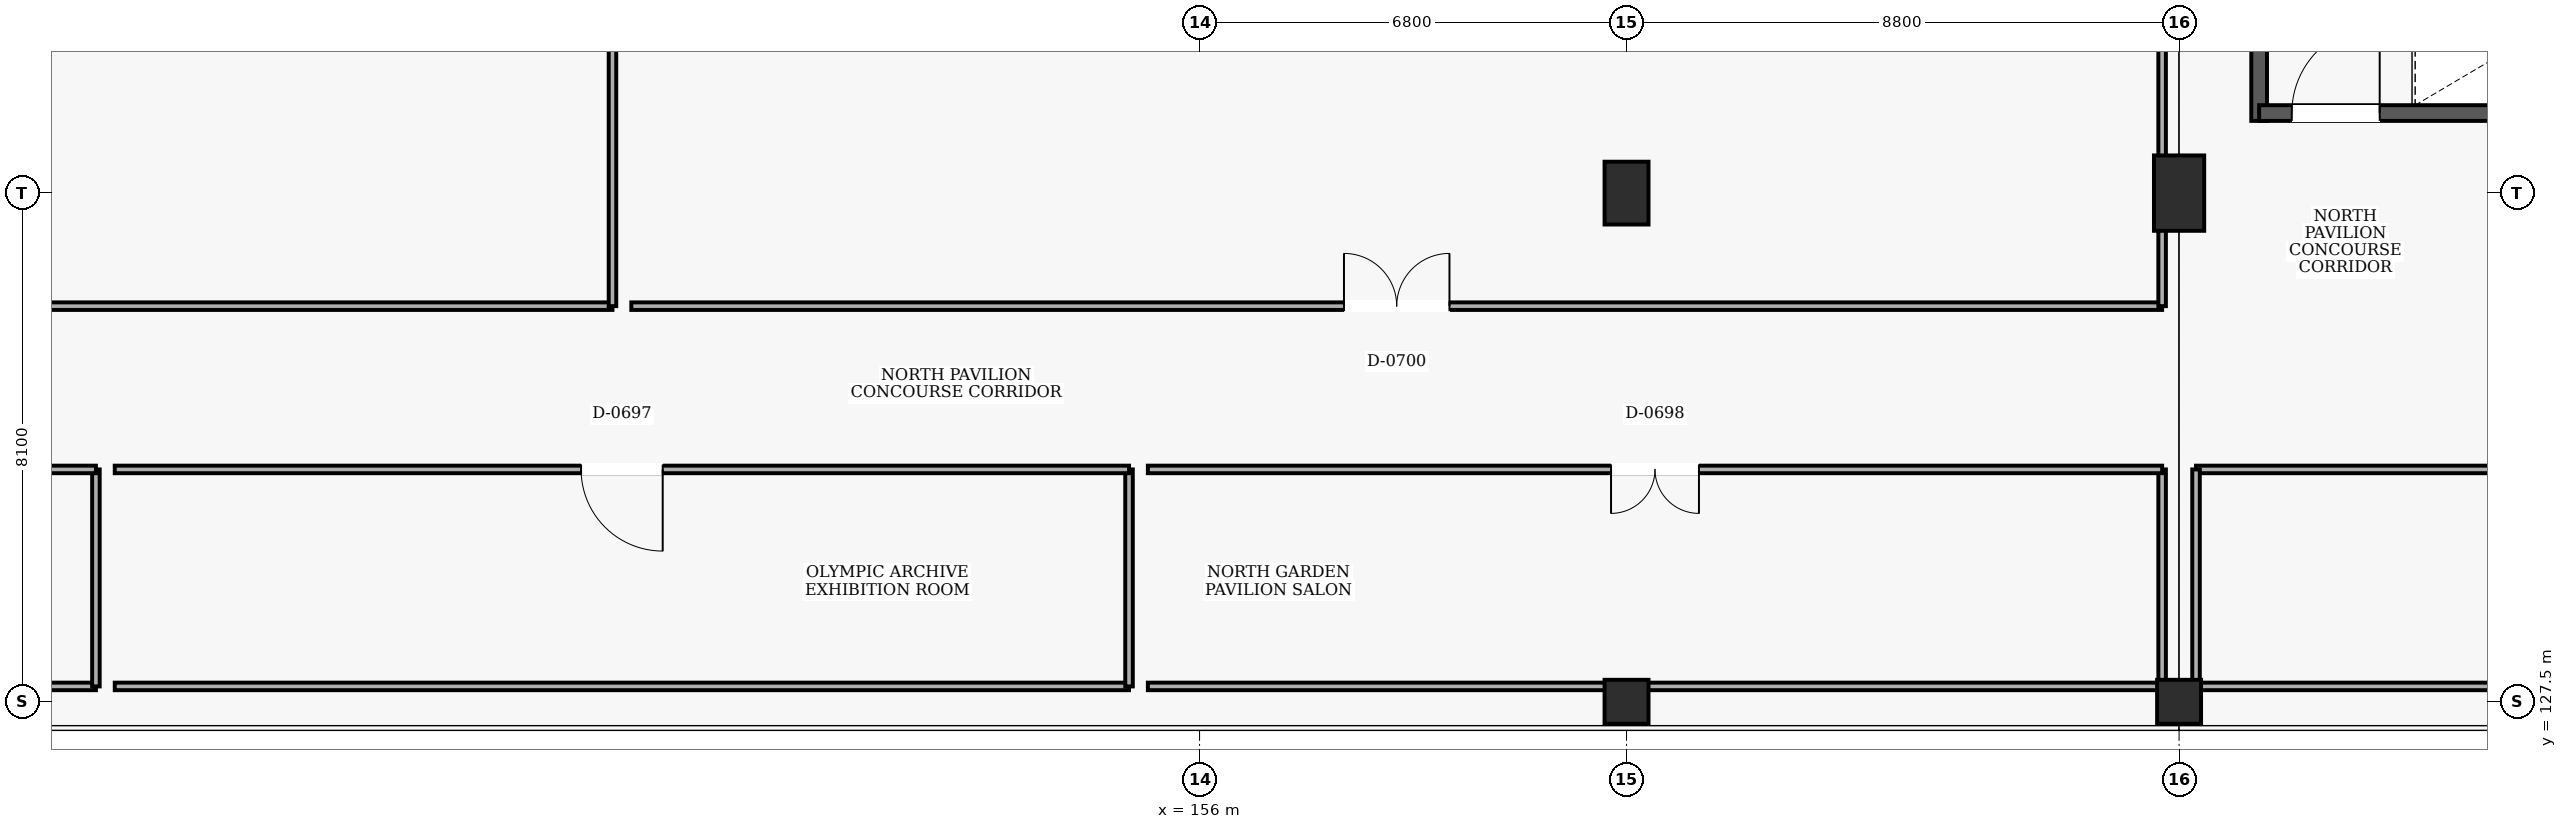
"""IFC4 building model, lengths in metres.
Left out: names, types, materials, properties, quantities, classifications, styles, units other than length and angle.
Written with IfcOpenShell. Run it as: python <this file> out.ifc"""

import sys

from ifc_helpers import new_model, si_unit, direction, frame, frame_2d, origin, origin_2d, place, context, subcontext, project, spatial, rectangle, extrude, element, fill, save


model = new_model("IFC4")
c1 = context("Model", 3, precision=1e-05, world=origin(), true_north=direction((0.0, 1.0)))
c2 = subcontext(c1, "Body", "Model", "MODEL_VIEW")
j1 = project(units=[si_unit("LENGTHUNIT", "METRE"), si_unit("PLANEANGLEUNIT", "RADIAN")], contexts=[c1])
p1 = place(None, origin())
s1 = spatial("IfcSite", under=j1, at=p1, CompositionType="ELEMENT")
p2 = place(p1, origin())
s2 = spatial("IfcBuilding", under=s1, at=p2, CompositionType="ELEMENT")
p3 = place(p2, frame((0.0, 0.0, 15.0)))
s3 = spatial("IfcBuildingStorey", under=s2, at=p3, CompositionType="ELEMENT", Elevation=15.0)
p4 = place(p3, frame((162.8, 127.5, 0.0), z_axis=(0.0, 0.0, 1.0), x_axis=(1.0, 0.0, 0.0)))
e1 = element("IfcColumn", 1, at=p4, inside=s3, PredefinedType="COLUMN", context=c2, shape_type="SweptSolid", body=[
    extrude(rectangle(XDim=0.7, YDim=0.7, at=origin_2d()), origin(), (0.0, 0.0, 1.0), 4.8),
])
p5 = place(p3, frame((162.8, 135.6, 0.0), z_axis=(0.0, 0.0, 1.0), x_axis=(1.0, 0.0, 0.0)))
e2 = element("IfcColumn", 2, at=p5, inside=s3, PredefinedType="COLUMN", context=c2, shape_type="SweptSolid", body=[
    extrude(rectangle(XDim=0.7, YDim=1.0, at=origin_2d()), origin(), (0.0, 0.0, 1.0), 4.8),
])
p6 = place(p3, frame((171.6, 127.5, 0.0), z_axis=(0.0, 0.0, 1.0), x_axis=(1.0, 0.0, 0.0)))
e3 = element("IfcColumn", 3, at=p6, inside=s3, PredefinedType="COLUMN", context=c2, shape_type="SweptSolid", body=[
    extrude(rectangle(XDim=0.7, YDim=0.7, at=origin_2d()), origin(), (0.0, 0.0, 1.0), 4.8),
])
p7 = place(p3, frame((171.6, 135.6, 0.0), z_axis=(0.0, 0.0, 1.0), x_axis=(1.0, 0.0, 0.0)))
e4 = element("IfcColumn", 4, at=p7, inside=s3, PredefinedType="COLUMN", context=c2, shape_type="SweptSolid", body=[
    extrude(rectangle(XDim=0.8, YDim=1.2, at=origin_2d()), origin(), (0.0, 0.0, 1.0), 4.8),
])
p8 = place(p3, frame((172.875, 142.12, 0.0), z_axis=(0.0, 0.0, 1.0), x_axis=(0.0, -1.0, 0.0)))
e5 = element("IfcWall", 5, at=p8, inside=s3, PredefinedType="SHEAR", context=c2, shape_type="SweptSolid", body=[
    extrude(rectangle(XDim=5.37, YDim=0.25, at=frame_2d((2.685, 0.0))), origin(), (0.0, 0.0, 1.0), 4.5),
])
p9 = place(p3, frame((172.875, 136.875, 0.0), z_axis=(0.0, 0.0, 1.0), x_axis=(1.0, 0.0, 0.0)))
e6 = element("IfcWall", 6, at=p9, inside=s3, PredefinedType="SHEAR", context=c2, shape_type="SweptSolid", body=[
    extrude(rectangle(XDim=10.85, YDim=0.25, at=frame_2d((5.425, 0.0))), origin(), (0.0, 0.0, 1.0), 4.5),
])
p10 = place(p9, frame((0.52, 0.0, 0.0)))
e7 = element("IfcOpeningElement", 7, at=p10, cuts=e6, PredefinedType="OPENING", context=c2, shape_type="SweptSolid", body=[
    extrude(rectangle(XDim=1.4, YDim=2.15, at=frame_2d((0.7, 1.075))), frame((0.0, 0.135, 0.0), z_axis=(0.0, -1.0, 0.0), x_axis=(1.0, 0.0, 0.0)), (0.0, 0.0, 1.0), 0.27),
])
p11 = place(p3, frame((122.27, 127.745, 0.0), z_axis=(0.0, 0.0, 1.0), x_axis=(1.0, 0.0, 0.0)))
e8 = element("IfcWall", 8, at=p11, inside=s3, PredefinedType="PARTITIONING", context=c2, shape_type="SweptSolid", body=[
    extrude(rectangle(XDim=16.153, YDim=0.12, at=frame_2d((8.077, 0.0))), origin(), (0.0, 0.0, 1.0), 4.5),
])
p12 = place(p3, frame((138.423, 127.745, 0.0), z_axis=(0.0, 0.0, 1.0), x_axis=(0.0, 1.0, 0.0)))
e9 = element("IfcWall", 9, at=p12, inside=s3, PredefinedType="PARTITIONING", context=c2, shape_type="SweptSolid", body=[
    extrude(rectangle(XDim=3.455, YDim=0.12, at=frame_2d((1.728, 0.0))), origin(), (0.0, 0.0, 1.0), 4.5),
])
p13 = place(p3, frame((138.423, 131.2, 0.0), z_axis=(0.0, 0.0, 1.0), x_axis=(-1.0, 0.0, 0.0)))
e10 = element("IfcWall", 10, at=p13, inside=s3, PredefinedType="PARTITIONING", context=c2, shape_type="SweptSolid", body=[
    extrude(rectangle(XDim=16.153, YDim=0.12, at=frame_2d((8.077, 0.0))), origin(), (0.0, 0.0, 1.0), 4.5),
])
p14 = place(p13, frame((7.477, 0.0, 0.0)))
e11 = element("IfcOpeningElement", 11, at=p14, cuts=e10, PredefinedType="OPENING", context=c2, shape_type="SweptSolid", body=[
    extrude(rectangle(XDim=1.2, YDim=2.15, at=frame_2d((0.6, 1.075))), frame((0.0, 0.07, 0.0), z_axis=(0.0, -1.0, 0.0), x_axis=(1.0, 0.0, 0.0)), (0.0, 0.0, 1.0), 0.14),
])
p15 = place(p3, frame((138.723, 127.745, 0.0), z_axis=(0.0, 0.0, 1.0), x_axis=(1.0, 0.0, 0.0)))
e12 = element("IfcWall", 12, at=p15, inside=s3, PredefinedType="PARTITIONING", context=c2, shape_type="SweptSolid", body=[
    extrude(rectangle(XDim=16.153, YDim=0.12, at=frame_2d((8.077, 0.0))), origin(), (0.0, 0.0, 1.0), 4.5),
])
p16 = place(p3, frame((154.877, 127.745, 0.0), z_axis=(0.0, 0.0, 1.0), x_axis=(0.0, 1.0, 0.0)))
e13 = element("IfcWall", 13, at=p16, inside=s3, PredefinedType="PARTITIONING", context=c2, shape_type="SweptSolid", body=[
    extrude(rectangle(XDim=3.455, YDim=0.12, at=frame_2d((1.728, 0.0))), origin(), (0.0, 0.0, 1.0), 4.5),
])
p17 = place(p3, frame((154.877, 131.2, 0.0), z_axis=(0.0, 0.0, 1.0), x_axis=(-1.0, 0.0, 0.0)))
e14 = element("IfcWall", 14, at=p17, inside=s3, PredefinedType="PARTITIONING", context=c2, shape_type="SweptSolid", body=[
    extrude(rectangle(XDim=16.153, YDim=0.12, at=frame_2d((8.077, 0.0))), origin(), (0.0, 0.0, 1.0), 4.5),
])
p18 = place(p17, frame((7.427, 0.0, 0.0)))
e15 = element("IfcOpeningElement", 15, at=p18, cuts=e14, PredefinedType="OPENING", context=c2, shape_type="SweptSolid", body=[
    extrude(rectangle(XDim=1.3, YDim=2.2, at=frame_2d((0.65, 1.1))), frame((0.0, 0.07, 0.0), z_axis=(0.0, -1.0, 0.0), x_axis=(1.0, 0.0, 0.0)), (0.0, 0.0, 1.0), 0.14),
])
p19 = place(p3, frame((155.177, 127.745, 0.0), z_axis=(0.0, 0.0, 1.0), x_axis=(1.0, 0.0, 0.0)))
e16 = element("IfcWall", 16, at=p19, inside=s3, PredefinedType="PARTITIONING", context=c2, shape_type="SweptSolid", body=[
    extrude(rectangle(XDim=16.153, YDim=0.12, at=frame_2d((8.077, 0.0))), origin(), (0.0, 0.0, 1.0), 3.78),
])
p20 = place(p3, frame((171.33, 127.745, 0.0), z_axis=(0.0, 0.0, 1.0), x_axis=(0.0, 1.0, 0.0)))
e17 = element("IfcWall", 17, at=p20, inside=s3, PredefinedType="PARTITIONING", context=c2, shape_type="SweptSolid", body=[
    extrude(rectangle(XDim=3.455, YDim=0.12, at=frame_2d((1.728, 0.0))), origin(), (0.0, 0.0, 1.0), 3.78),
])
p21 = place(p3, frame((171.33, 131.2, 0.0), z_axis=(0.0, 0.0, 1.0), x_axis=(-1.0, 0.0, 0.0)))
e18 = element("IfcWall", 18, at=p21, inside=s3, PredefinedType="PARTITIONING", context=c2, shape_type="SweptSolid", body=[
    extrude(rectangle(XDim=16.153, YDim=0.12, at=frame_2d((8.077, 0.0))), origin(), (0.0, 0.0, 1.0), 4.5),
])
p22 = place(p21, frame((7.377, 0.0, 0.0)))
e19 = element("IfcOpeningElement", 19, at=p22, cuts=e18, PredefinedType="OPENING", context=c2, shape_type="SweptSolid", body=[
    extrude(rectangle(XDim=1.4, YDim=2.2, at=frame_2d((0.7, 1.1))), frame((0.0, 0.07, 0.0), z_axis=(0.0, -1.0, 0.0), x_axis=(1.0, 0.0, 0.0)), (0.0, 0.0, 1.0), 0.14),
])
p23 = place(p3, frame((122.27, 133.8, 0.0), z_axis=(0.0, 0.0, 1.0), x_axis=(1.0, 0.0, 0.0)))
e20 = element("IfcWall", 20, at=p23, inside=s3, PredefinedType="PARTITIONING", context=c2, shape_type="SweptSolid", body=[
    extrude(rectangle(XDim=24.38, YDim=0.12, at=frame_2d((12.19, 0.0))), origin(), (0.0, 0.0, 1.0), 4.5),
])
p24 = place(p23, frame((11.415, 0.0, 0.0)))
e21 = element("IfcOpeningElement", 21, at=p24, cuts=e20, PredefinedType="OPENING", context=c2, shape_type="SweptSolid", body=[
    extrude(rectangle(XDim=1.55, YDim=2.2, at=frame_2d((0.775, 1.1))), frame((0.0, 0.07, 0.0), z_axis=(0.0, -1.0, 0.0), x_axis=(1.0, 0.0, 0.0)), (0.0, 0.0, 1.0), 0.14),
])
p25 = place(p3, frame((146.65, 133.8, 0.0), z_axis=(0.0, 0.0, 1.0), x_axis=(0.0, 1.0, 0.0)))
e22 = element("IfcWall", 22, at=p25, inside=s3, PredefinedType="PARTITIONING", context=c2, shape_type="SweptSolid", body=[
    extrude(rectangle(XDim=17.5, YDim=0.12, at=frame_2d((8.75, 0.0))), origin(), (0.0, 0.0, 1.0), 4.5),
])
p26 = place(p3, frame((146.95, 133.8, 0.0), z_axis=(0.0, 0.0, 1.0), x_axis=(1.0, 0.0, 0.0)))
e23 = element("IfcWall", 23, at=p26, inside=s3, PredefinedType="PARTITIONING", context=c2, shape_type="SweptSolid", body=[
    extrude(rectangle(XDim=24.38, YDim=0.12, at=frame_2d((12.19, 0.0))), origin(), (0.0, 0.0, 1.0), 4.5),
])
p27 = place(p26, frame((11.35, 0.0, 0.0)))
e24 = element("IfcOpeningElement", 24, at=p27, cuts=e23, PredefinedType="OPENING", context=c2, shape_type="SweptSolid", body=[
    extrude(rectangle(XDim=1.68, YDim=2.25, at=frame_2d((0.84, 1.125))), frame((0.0, 0.07, 0.0), z_axis=(0.0, -1.0, 0.0), x_axis=(1.0, 0.0, 0.0)), (0.0, 0.0, 1.0), 0.14),
])
p28 = place(p3, frame((171.33, 133.8, 0.0), z_axis=(0.0, 0.0, 1.0), x_axis=(0.0, 1.0, 0.0)))
e25 = element("IfcWall", 25, at=p28, inside=s3, PredefinedType="PARTITIONING", context=c2, shape_type="SweptSolid", body=[
    extrude(rectangle(XDim=17.5, YDim=0.12, at=frame_2d((8.75, 0.0))), origin(), (0.0, 0.0, 1.0), 3.78),
])
p29 = place(p3, frame((171.87, 127.745, 0.0), z_axis=(0.0, 0.0, 1.0), x_axis=(1.0, 0.0, 0.0)))
e26 = element("IfcWall", 26, at=p29, inside=s3, PredefinedType="PARTITIONING", context=c2, shape_type="SweptSolid", body=[
    extrude(rectangle(XDim=22.84, YDim=0.12, at=frame_2d((11.42, 0.0))), origin(), (0.0, 0.0, 1.0), 3.78),
])
p30 = place(p3, frame((194.71, 131.2, 0.0), z_axis=(0.0, 0.0, 1.0), x_axis=(-1.0, 0.0, 0.0)))
e27 = element("IfcWall", 27, at=p30, inside=s3, PredefinedType="PARTITIONING", context=c2, shape_type="SweptSolid", body=[
    extrude(rectangle(XDim=22.84, YDim=0.12, at=frame_2d((11.42, 0.0))), origin(), (0.0, 0.0, 1.0), 4.5),
])
p31 = place(p30, frame((10.54, 0.0, 0.0)))
e28 = element("IfcOpeningElement", 28, at=p31, cuts=e27, PredefinedType="OPENING", context=c2, shape_type="SweptSolid", body=[
    extrude(rectangle(XDim=1.76, YDim=2.25, at=frame_2d((0.88, 1.125))), frame((0.0, 0.07, 0.0), z_axis=(0.0, -1.0, 0.0), x_axis=(1.0, 0.0, 0.0)), (0.0, 0.0, 1.0), 0.14),
])
p32 = place(p3, frame((171.87, 131.2, 0.0), z_axis=(0.0, 0.0, 1.0), x_axis=(0.0, -1.0, 0.0)))
e29 = element("IfcWall", 29, at=p32, inside=s3, PredefinedType="PARTITIONING", context=c2, shape_type="SweptSolid", body=[
    extrude(rectangle(XDim=3.455, YDim=0.12, at=frame_2d((1.728, 0.0))), origin(), (0.0, 0.0, 1.0), 3.78),
])
p33 = place(p10, origin())
e30 = element("IfcDoor", 30, at=p33, inside=s3, OperationType="SINGLE_SWING_RIGHT", PredefinedType="DOOR", context=c2, shape_type="SweptSolid", body=[
    extrude(rectangle(XDim=1.4, YDim=2.15, at=frame_2d((0.7, 1.075))), frame((0.0, 0.025, 0.0), z_axis=(0.0, -1.0, 0.0), x_axis=(1.0, 0.0, 0.0)), (0.0, 0.0, 1.0), 0.05),
])
fill(e7, e30)
p34 = place(p18, origin())
e31 = element("IfcDoor", 31, at=p34, inside=s3, OperationType="SINGLE_SWING_LEFT", PredefinedType="DOOR", context=c2, shape_type="SweptSolid", body=[
    extrude(rectangle(XDim=1.3, YDim=2.2, at=frame_2d((0.65, 1.1))), frame((0.0, 0.025, 0.0), z_axis=(0.0, -1.0, 0.0), x_axis=(1.0, 0.0, 0.0)), (0.0, 0.0, 1.0), 0.05),
])
fill(e15, e31)
p35 = place(p22, origin())
e32 = element("IfcDoor", 32, at=p35, inside=s3, OperationType="DOUBLE_DOOR_SINGLE_SWING", PredefinedType="DOOR", context=c2, shape_type="SweptSolid", body=[
    extrude(rectangle(XDim=1.4, YDim=2.2, at=frame_2d((0.7, 1.1))), frame((0.0, 0.025, 0.0), z_axis=(0.0, -1.0, 0.0), x_axis=(1.0, 0.0, 0.0)), (0.0, 0.0, 1.0), 0.05),
])
fill(e19, e32)
p36 = place(p27, origin())
e33 = element("IfcDoor", 33, at=p36, inside=s3, OperationType="DOUBLE_DOOR_SINGLE_SWING", PredefinedType="DOOR", context=c2, shape_type="SweptSolid", body=[
    extrude(rectangle(XDim=1.68, YDim=2.25, at=frame_2d((0.84, 1.125))), frame((0.0, 0.025, 0.0), z_axis=(0.0, -1.0, 0.0), x_axis=(1.0, 0.0, 0.0)), (0.0, 0.0, 1.0), 0.05),
])
fill(e24, e33)
save(model, sys.argv[1])
